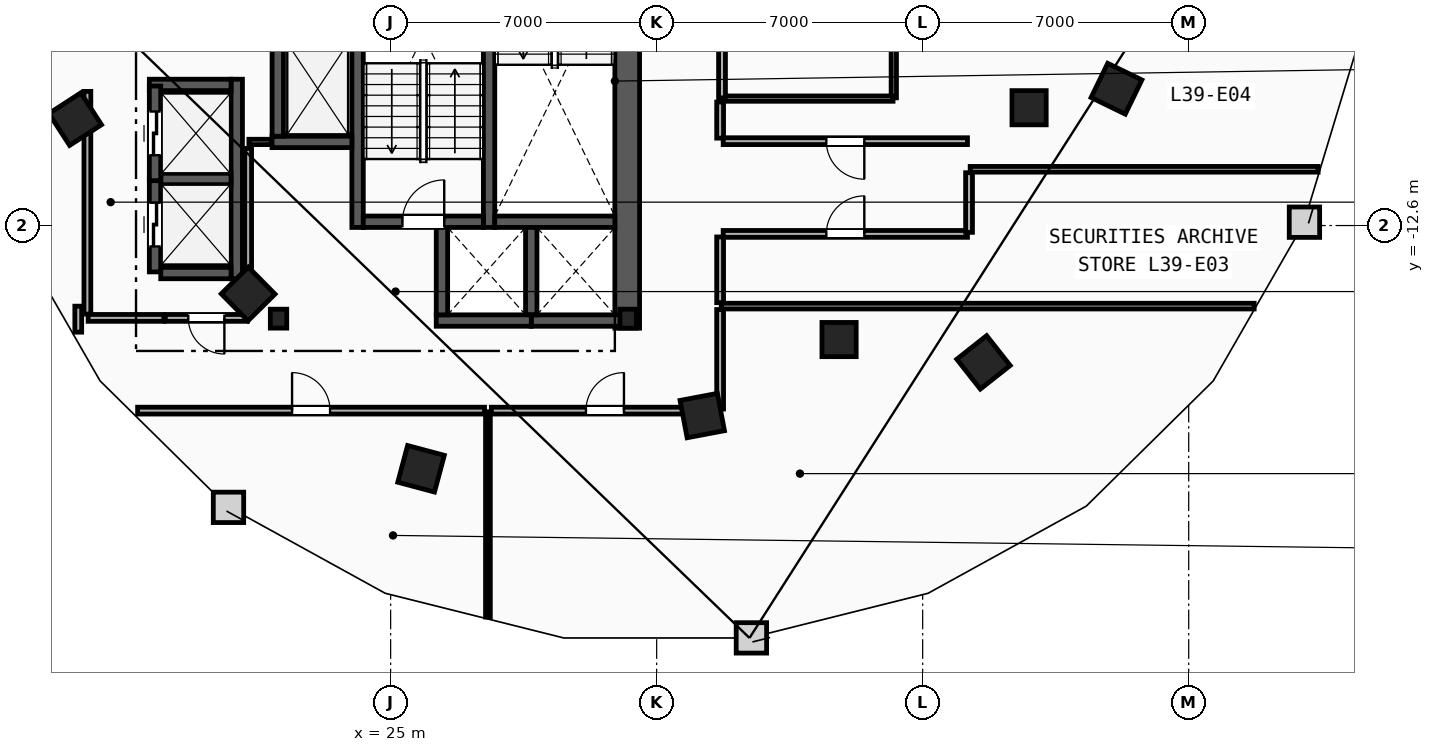
"""IFC4 building model, lengths in metres.
Left out: names, types, materials, properties, quantities, classifications, styles, units other than length and angle.
Written with IfcOpenShell. Run it as: python <this file> out.ifc"""

import sys

from ifc_helpers import new_model, si_unit, direction, frame, frame_2d, origin, origin_2d, place, context, subcontext, project, spatial, rectangle, i_section, extrude, element, fill, save


model = new_model("IFC4")
c1 = context("Model", 3, precision=1e-05, world=origin(), true_north=direction((0.0, 1.0)))
c2 = subcontext(c1, "Body", "Model", "MODEL_VIEW")
j1 = project(units=[si_unit("LENGTHUNIT", "METRE"), si_unit("PLANEANGLEUNIT", "RADIAN")], contexts=[c1])
p1 = place(None, origin())
s1 = spatial("IfcSite", under=j1, at=p1, CompositionType="ELEMENT")
p2 = place(p1, origin())
s2 = spatial("IfcBuilding", under=s1, at=p2, CompositionType="ELEMENT")
p3 = place(p2, frame((0.0, 0.0, 151.2)))
s3 = spatial("IfcBuildingStorey", under=s2, at=p3, CompositionType="ELEMENT", Elevation=151.2)
for number, where, z_axis, x_axis in (
    (1, (22.05, -15.05, 0.0), (0.0, 0.0, 1.0), (1.0, 0.0, 0.0)),
    (2, (31.25, -15.05, 0.0), (0.0, 0.0, 1.0), (1.0, 0.0, 0.0)),
):
    element("IfcColumn", number, at=place(p3, frame(where, z_axis=z_axis, x_axis=x_axis)), inside=s3, PredefinedType="COLUMN", context=c2, shape_type="SweptSolid", body=[
        extrude(i_section(OverallWidth=0.432, OverallDepth=0.498, WebThickness=0.056, FlangeThickness=0.089, FilletRadius=0.018, at=origin_2d()), origin(), (0.0, 0.0, 1.0), 3.6),
    ])
for number, where, z_axis, x_axis in (
    (3, (41.8, -9.5, 0.0), (0.0, 0.0, 1.0), (1.0, 0.0, 0.0)),
    (4, (36.8, -15.6, 0.0), (0.0, 0.0, 1.0), (1.0, 0.0, 0.0)),
):
    element("IfcColumn", number, at=place(p3, frame(where, z_axis=z_axis, x_axis=x_axis)), inside=s3, PredefinedType="COLUMN", context=c2, shape_type="SweptSolid", body=[
        extrude(rectangle(XDim=0.9, YDim=0.9, at=origin_2d()), origin(), (0.0, 0.0, 1.0), 3.6),
    ])
for number, where, z_axis, x_axis in (
    (5, (16.7, -9.8, 0.0), (0.0, 0.0, 1.0), (0.544, -0.839, 0.0)),
    (6, (21.25, -14.4, 0.0), (0.0, 0.0, 1.0), (0.703, -0.711, 0.0)),
    (7, (25.8, -19.0, 0.0), (0.0, 0.0, 1.0), (0.966, -0.259, 0.0)),
    (8, (33.2, -17.6, 0.0), (0.0, 0.0, 1.0), (0.983, 0.186, 0.0)),
    (9, (40.6, -16.2, 0.0), (0.0, 0.0, 1.0), (0.785, 0.619, 0.0)),
    (10, (44.1, -9.0, 0.0), (0.0, 0.0, 1.0), (0.437, 0.899, 0.0)),
):
    element("IfcColumn", number, at=place(p3, frame(where, z_axis=z_axis, x_axis=x_axis)), inside=s3, PredefinedType="COLUMN", context=c2, shape_type="SweptSolid", body=[
        extrude(rectangle(XDim=1.0, YDim=1.0, at=origin_2d()), origin(), (0.0, 0.0, 1.0), 3.6),
    ])
p4 = place(p3, frame((31.225, -15.3, 0.0), z_axis=(0.0, 0.0, 1.0), x_axis=(0.0, 1.0, 0.0)))
e11 = element("IfcWall", 11, at=p4, inside=s3, PredefinedType="SHEAR", context=c2, shape_type="SweptSolid", body=[
    extrude(rectangle(XDim=13.33, YDim=0.65, at=frame_2d((6.665, 0.0))), origin(), (0.0, 0.0, 1.0), 3.36),
])
for number, where, z_axis, x_axis in (
    (12, (27.59, -12.65, 0.0), (0.0, 0.0, 1.0), (0.0, 1.0, 0.0)),
    (13, (24.13, -12.65, 0.0), (0.0, 0.0, 1.0), (0.0, 1.0, 0.0)),
):
    element("IfcWall", number, at=place(p3, frame(where, z_axis=z_axis, x_axis=x_axis)), inside=s3, PredefinedType="SHEAR", context=c2, shape_type="SweptSolid", body=[
        extrude(rectangle(XDim=10.68, YDim=0.3, at=frame_2d((5.34, 0.0))), origin(), (0.0, 0.0, 1.0), 3.36),
    ])
p5 = place(p3, frame((27.74, -12.5, 0.0), z_axis=(0.0, 0.0, 1.0), x_axis=(1.0, 0.0, 0.0)))
e14 = element("IfcWall", 14, at=p5, inside=s3, PredefinedType="SHEAR", context=c2, shape_type="SweptSolid", body=[
    extrude(rectangle(XDim=3.16, YDim=0.3, at=frame_2d((1.58, 0.0))), origin(), (0.0, 0.0, 1.0), 3.36),
])
p6 = place(p3, frame((24.28, -12.5, 0.0), z_axis=(0.0, 0.0, 1.0), x_axis=(1.0, 0.0, 0.0)))
e15 = element("IfcWall", 15, at=p6, inside=s3, PredefinedType="SHEAR", context=c2, shape_type="SweptSolid", body=[
    extrude(rectangle(XDim=3.16, YDim=0.3, at=frame_2d((1.58, 0.0))), origin(), (0.0, 0.0, 1.0), 3.36),
])
p7 = place(p6, frame((1.03, 0.0, 0.0)))
e16 = element("IfcOpeningElement", 16, at=p7, cuts=e15, PredefinedType="OPENING", context=c2, shape_type="SweptSolid", body=[
    extrude(rectangle(XDim=1.1, YDim=2.15, at=frame_2d((0.55, 1.075))), frame((0.0, 0.16, 0.0), z_axis=(0.0, -1.0, 0.0), x_axis=(1.0, 0.0, 0.0)), (0.0, 0.0, 1.0), 0.32),
])
p8 = place(p3, frame((21.88, -10.4, 0.0), z_axis=(0.0, 0.0, 1.0), x_axis=(1.0, 0.0, 0.0)))
e17 = element("IfcWall", 17, at=p8, inside=s3, PredefinedType="SHEAR", context=c2, shape_type="SweptSolid", body=[
    extrude(rectangle(XDim=2.1, YDim=0.3, at=frame_2d((1.05, 0.0))), origin(), (0.0, 0.0, 1.0), 3.36),
])
for number, where, z_axis, x_axis in (
    (18, (22.03, -10.25, 0.0), (0.0, 0.0, 1.0), (0.0, 1.0, 0.0)),
    (19, (28.7, -15.1, 0.0), (0.0, 0.0, 1.0), (1.0, 0.0, 0.0)),
):
    element("IfcWall", number, at=place(p3, frame(where, z_axis=z_axis, x_axis=x_axis)), inside=s3, PredefinedType="SHEAR", context=c2, shape_type="SweptSolid", body=[
        extrude(rectangle(XDim=2.5, YDim=0.3, at=frame_2d((1.25, 0.0))), origin(), (0.0, 0.0, 1.0), 3.36),
    ])
p9 = place(p3, frame((28.7, -14.95, 0.0), z_axis=(0.0, 0.0, 1.0), x_axis=(0.0, 1.0, 0.0)))
e20 = element("IfcWall", 20, at=p9, inside=s3, PredefinedType="SHEAR", context=c2, shape_type="SweptSolid", body=[
    extrude(rectangle(XDim=2.3, YDim=0.3, at=frame_2d((1.15, 0.0))), origin(), (0.0, 0.0, 1.0), 3.36),
])
p10 = place(p3, frame((26.2, -15.1, 0.0), z_axis=(0.0, 0.0, 1.0), x_axis=(1.0, 0.0, 0.0)))
e21 = element("IfcWall", 21, at=p10, inside=s3, PredefinedType="SHEAR", context=c2, shape_type="SweptSolid", body=[
    extrude(rectangle(XDim=2.5, YDim=0.3, at=frame_2d((1.25, 0.0))), origin(), (0.0, 0.0, 1.0), 3.36),
])
p11 = place(p3, frame((26.35, -14.95, 0.0), z_axis=(0.0, 0.0, 1.0), x_axis=(0.0, 1.0, 0.0)))
e22 = element("IfcWall", 22, at=p11, inside=s3, PredefinedType="SHEAR", context=c2, shape_type="SweptSolid", body=[
    extrude(rectangle(XDim=2.3, YDim=0.3, at=frame_2d((1.15, 0.0))), origin(), (0.0, 0.0, 1.0), 3.36),
])
p12 = place(p3, frame((20.95, -14.0, 0.0), z_axis=(0.0, 0.0, 1.0), x_axis=(0.0, 1.0, 0.0)))
e23 = element("IfcWall", 23, at=p12, inside=s3, PredefinedType="SHEAR", context=c2, shape_type="SweptSolid", body=[
    extrude(rectangle(XDim=5.25, YDim=0.3, at=frame_2d((2.625, 0.0))), origin(), (0.0, 0.0, 1.0), 3.36),
])
p13 = place(p3, frame((18.95, -13.85, 0.0), z_axis=(0.0, 0.0, 1.0), x_axis=(1.0, 0.0, 0.0)))
e24 = element("IfcWall", 24, at=p13, inside=s3, PredefinedType="SHEAR", context=c2, shape_type="SweptSolid", body=[
    extrude(rectangle(XDim=1.85, YDim=0.3, at=frame_2d((0.925, 0.0))), origin(), (0.0, 0.0, 1.0), 3.36),
])
p14 = place(p3, frame((18.65, -8.9, 0.0), z_axis=(0.0, 0.0, 1.0), x_axis=(1.0, 0.0, 0.0)))
e25 = element("IfcWall", 25, at=p14, inside=s3, PredefinedType="SHEAR", context=c2, shape_type="SweptSolid", body=[
    extrude(rectangle(XDim=2.15, YDim=0.3, at=frame_2d((1.075, 0.0))), origin(), (0.0, 0.0, 1.0), 3.36),
])
p15 = place(p3, frame((18.95, -11.375, 0.0), z_axis=(0.0, 0.0, 1.0), x_axis=(1.0, 0.0, 0.0)))
e26 = element("IfcWall", 26, at=p15, inside=s3, PredefinedType="SHEAR", context=c2, shape_type="SweptSolid", body=[
    extrude(rectangle(XDim=1.85, YDim=0.3, at=frame_2d((0.925, 0.0))), origin(), (0.0, 0.0, 1.0), 3.36),
])
p16 = place(p3, frame((18.8, -13.82, 0.0), z_axis=(0.0, 0.0, 1.0), x_axis=(0.0, 1.0, 0.0)))
e27 = element("IfcWall", 27, at=p16, inside=s3, PredefinedType="SHEAR", context=c2, shape_type="SweptSolid", body=[
    extrude(rectangle(XDim=2.49, YDim=0.3, at=frame_2d((1.245, 0.0))), origin(), (0.0, 0.0, 1.0), 3.36),
])
p17 = place(p16, frame((0.67, 0.0, 0.0)))
e28 = element("IfcOpeningElement", 28, at=p17, cuts=e27, PredefinedType="OPENING", context=c2, shape_type="SweptSolid", body=[
    extrude(rectangle(XDim=1.15, YDim=2.2, at=frame_2d((0.575, 1.1))), frame((0.0, 0.16, 0.0), z_axis=(0.0, -1.0, 0.0), x_axis=(1.0, 0.0, 0.0)), (0.0, 0.0, 1.0), 0.32),
])
p18 = place(p3, frame((18.8, -11.42, 0.0), z_axis=(0.0, 0.0, 1.0), x_axis=(0.0, 1.0, 0.0)))
e29 = element("IfcWall", 29, at=p18, inside=s3, PredefinedType="SHEAR", context=c2, shape_type="SweptSolid", body=[
    extrude(rectangle(XDim=2.49, YDim=0.3, at=frame_2d((1.245, 0.0))), origin(), (0.0, 0.0, 1.0), 3.36),
])
p19 = place(p18, frame((0.67, 0.0, 0.0)))
e30 = element("IfcOpeningElement", 30, at=p19, cuts=e29, PredefinedType="OPENING", context=c2, shape_type="SweptSolid", body=[
    extrude(rectangle(XDim=1.15, YDim=2.2, at=frame_2d((0.575, 1.1))), frame((0.0, 0.16, 0.0), z_axis=(0.0, -1.0, 0.0), x_axis=(1.0, 0.0, 0.0)), (0.0, 0.0, 1.0), 0.32),
])
p20 = place(p3, frame((17.02, -14.93, 0.0), z_axis=(0.0, 0.0, 1.0), x_axis=(0.0, 1.0, 0.0)))
e31 = element("IfcWall", 31, at=p20, inside=s3, PredefinedType="PARTITIONING", context=c2, shape_type="SweptSolid", body=[
    extrude(rectangle(XDim=5.86, YDim=0.18, at=frame_2d((2.93, 0.0))), origin(), (0.0, 0.0, 1.0), 3.36),
])
p21 = place(p3, frame((17.04, -15.03, 0.0), z_axis=(0.0, 0.0, 1.0), x_axis=(1.0, 0.0, 0.0)))
e32 = element("IfcWall", 32, at=p21, inside=s3, PredefinedType="PARTITIONING", context=c2, shape_type="SweptSolid", body=[
    extrude(rectangle(XDim=1.99, YDim=0.18, at=frame_2d((0.995, 0.0))), origin(), (0.0, 0.0, 1.0), 3.36),
])
p22 = place(p3, frame((21.23, -15.03, 0.0), z_axis=(0.0, 0.0, 1.0), x_axis=(-1.0, 0.0, 0.0)))
e33 = element("IfcWall", 33, at=p22, inside=s3, PredefinedType="PARTITIONING", context=c2, shape_type="SweptSolid", body=[
    extrude(rectangle(XDim=2.16, YDim=0.18, at=frame_2d((1.08, 0.0))), origin(), (0.0, 0.0, 1.0), 3.36),
])
p23 = place(p22, frame((0.605, 0.0, 0.0)))
e34 = element("IfcOpeningElement", 34, at=p23, cuts=e33, PredefinedType="OPENING", context=c2, shape_type="SweptSolid", body=[
    extrude(rectangle(XDim=0.95, YDim=2.1, at=frame_2d((0.475, 1.05))), frame((0.0, 0.1, 0.0), z_axis=(0.0, -1.0, 0.0), x_axis=(1.0, 0.0, 0.0)), (0.0, 0.0, 1.0), 0.2),
])
p24 = place(p3, frame((21.27, -10.4, 0.0), z_axis=(0.0, 0.0, 1.0), x_axis=(1.0, 0.0, 0.0)))
e35 = element("IfcWall", 35, at=p24, inside=s3, PredefinedType="PARTITIONING", context=c2, shape_type="SweptSolid", body=[
    extrude(rectangle(XDim=0.59, YDim=0.14, at=frame_2d((0.295, 0.0))), origin(), (0.0, 0.0, 1.0), 3.36),
])
p25 = place(p3, frame((21.25, -14.93, 0.0), z_axis=(0.0, 0.0, 1.0), x_axis=(0.0, 1.0, 0.0)))
e36 = element("IfcWall", 36, at=p25, inside=s3, PredefinedType="PARTITIONING", context=c2, shape_type="SweptSolid", body=[
    extrude(rectangle(XDim=4.36, YDim=0.18, at=frame_2d((2.18, 0.0))), origin(), (0.0, 0.0, 1.0), 3.36),
])
p26 = place(p3, frame((38.24, -9.24, 0.0), z_axis=(0.0, 0.0, 1.0), x_axis=(0.0, 1.0, 0.0)))
e37 = element("IfcWall", 37, at=p26, inside=s3, PredefinedType="PARTITIONING", context=c2, shape_type="SweptSolid", body=[
    extrude(rectangle(XDim=2.635, YDim=0.14, at=frame_2d((1.317, 0.0))), origin(), (0.0, 0.0, 1.0), 3.36),
])
p27 = place(p3, frame((33.74, -9.26, 0.0), z_axis=(0.0, 0.0, 1.0), x_axis=(1.0, 0.0, 0.0)))
e38 = element("IfcWall", 38, at=p27, inside=s3, PredefinedType="PARTITIONING", context=c2, shape_type="SweptSolid", body=[
    extrude(rectangle(XDim=4.48, YDim=0.14, at=frame_2d((2.24, 0.0))), origin(), (0.0, 0.0, 1.0), 3.36),
])
p28 = place(p3, frame((33.72, -9.24, 0.0), z_axis=(0.0, 0.0, 1.0), x_axis=(0.0, 1.0, 0.0)))
e39 = element("IfcWall", 39, at=p28, inside=s3, PredefinedType="PARTITIONING", context=c2, shape_type="SweptSolid", body=[
    extrude(rectangle(XDim=4.16, YDim=0.18, at=frame_2d((2.08, 0.0))), origin(), (0.0, 0.0, 1.0), 3.36),
])
p29 = place(p28, frame((1.58, 0.0, 0.0)))
e40 = element("IfcOpeningElement", 40, at=p29, cuts=e39, PredefinedType="OPENING", context=c2, shape_type="SweptSolid", body=[
    extrude(rectangle(XDim=1.0, YDim=2.15, at=frame_2d((0.5, 1.075))), frame((0.0, 0.1, 0.0), z_axis=(0.0, -1.0, 0.0), x_axis=(1.0, 0.0, 0.0)), (0.0, 0.0, 1.0), 0.2),
])
p30 = place(p3, frame((40.25, -11.12, 0.0), z_axis=(0.0, 0.0, 1.0), x_axis=(1.0, 0.0, 0.0)))
e41 = element("IfcWall", 41, at=p30, inside=s3, PredefinedType="PARTITIONING", context=c2, shape_type="SweptSolid", body=[
    extrude(rectangle(XDim=9.156, YDim=0.15, at=frame_2d((4.578, 0.0))), origin(), (0.0, 0.0, 1.0), 3.36),
])
p31 = place(p3, frame((33.7, -14.72, 0.0), z_axis=(0.0, 0.0, 1.0), x_axis=(1.0, 0.0, 0.0)))
e42 = element("IfcWall", 42, at=p31, inside=s3, PredefinedType="PARTITIONING", context=c2, shape_type="SweptSolid", body=[
    extrude(rectangle(XDim=14.023, YDim=0.15, at=frame_2d((7.011, 0.0))), origin(), (0.0, 0.0, 1.0), 3.36),
])
p32 = place(p3, frame((27.56, -22.901, 0.0), z_axis=(0.0, 0.0, 1.0), x_axis=(0.0, 1.0, 0.0)))
e43 = element("IfcWall", 43, at=p32, inside=s3, PredefinedType="PARTITIONING", context=c2, shape_type="SweptSolid", body=[
    extrude(rectangle(XDim=5.401, YDim=0.125, at=frame_2d((2.701, 0.0))), origin(), (0.0, 0.0, 1.0), 3.36),
])
p33 = place(p3, frame((18.342, -17.47, 0.0), z_axis=(0.0, 0.0, 1.0), x_axis=(1.0, 0.0, 0.0)))
e44 = element("IfcWall", 44, at=p33, inside=s3, PredefinedType="PARTITIONING", context=c2, shape_type="SweptSolid", body=[
    extrude(rectangle(XDim=9.128, YDim=0.18, at=frame_2d((4.564, 0.0))), origin(), (0.0, 0.0, 1.0), 3.36),
])
p34 = place(p33, frame((4.064, 0.0, 0.0)))
e45 = element("IfcOpeningElement", 45, at=p34, cuts=e44, PredefinedType="OPENING", context=c2, shape_type="SweptSolid", body=[
    extrude(rectangle(XDim=1.0, YDim=2.15, at=frame_2d((0.5, 1.075))), frame((0.0, 0.1, 0.0), z_axis=(0.0, -1.0, 0.0), x_axis=(1.0, 0.0, 0.0)), (0.0, 0.0, 1.0), 0.2),
])
p35 = place(p3, frame((27.65, -17.47, 0.0), z_axis=(0.0, 0.0, 1.0), x_axis=(1.0, 0.0, 0.0)))
e46 = element("IfcWall", 46, at=p35, inside=s3, PredefinedType="PARTITIONING", context=c2, shape_type="SweptSolid", body=[
    extrude(rectangle(XDim=5.979, YDim=0.18, at=frame_2d((2.989, 0.0))), origin(), (0.0, 0.0, 1.0), 3.36),
])
p36 = place(p35, frame((2.489, 0.0, 0.0)))
e47 = element("IfcOpeningElement", 47, at=p36, cuts=e46, PredefinedType="OPENING", context=c2, shape_type="SweptSolid", body=[
    extrude(rectangle(XDim=1.0, YDim=2.15, at=frame_2d((0.5, 1.075))), frame((0.0, 0.1, 0.0), z_axis=(0.0, -1.0, 0.0), x_axis=(1.0, 0.0, 0.0)), (0.0, 0.0, 1.0), 0.2),
])
p37 = place(p3, frame((33.67, -17.428, 0.0), z_axis=(0.0, 0.0, 1.0), x_axis=(0.0, 1.0, 0.0)))
e48 = element("IfcWall", 48, at=p37, inside=s3, PredefinedType="PARTITIONING", context=c2, shape_type="SweptSolid", body=[
    extrude(rectangle(XDim=2.618, YDim=0.18, at=frame_2d((1.309, 0.0))), origin(), (0.0, 0.0, 1.0), 3.36),
])
p38 = place(p3, frame((33.75, -12.82, 0.0), z_axis=(0.0, 0.0, 1.0), x_axis=(1.0, 0.0, 0.0)))
e49 = element("IfcWall", 49, at=p38, inside=s3, PredefinedType="PARTITIONING", context=c2, shape_type="SweptSolid", body=[
    extrude(rectangle(XDim=6.428, YDim=0.18, at=frame_2d((3.214, 0.0))), origin(), (0.0, 0.0, 1.0), 3.36),
])
p39 = place(p38, frame((2.714, 0.0, 0.0)))
e50 = element("IfcOpeningElement", 50, at=p39, cuts=e49, PredefinedType="OPENING", context=c2, shape_type="SweptSolid", body=[
    extrude(rectangle(XDim=1.0, YDim=2.15, at=frame_2d((0.5, 1.075))), frame((0.0, 0.1, 0.0), z_axis=(0.0, -1.0, 0.0), x_axis=(1.0, 0.0, 0.0)), (0.0, 0.0, 1.0), 0.2),
])
p40 = place(p3, frame((33.67, -14.63, 0.0), z_axis=(0.0, 0.0, 1.0), x_axis=(0.0, 1.0, 0.0)))
e51 = element("IfcWall", 51, at=p40, inside=s3, PredefinedType="PARTITIONING", context=c2, shape_type="SweptSolid", body=[
    extrude(rectangle(XDim=1.73, YDim=0.18, at=frame_2d((0.865, 0.0))), origin(), (0.0, 0.0, 1.0), 3.36),
])
p41 = place(p3, frame((40.22, -12.779, 0.0), z_axis=(0.0, 0.0, 1.0), x_axis=(0.0, 1.0, 0.0)))
e52 = element("IfcWall", 52, at=p41, inside=s3, PredefinedType="PARTITIONING", context=c2, shape_type="SweptSolid", body=[
    extrude(rectangle(XDim=1.569, YDim=0.18, at=frame_2d((0.784, 0.0))), origin(), (0.0, 0.0, 1.0), 3.36),
])
p42 = place(p3, frame((40.178, -10.38, 0.0), z_axis=(0.0, 0.0, 1.0), x_axis=(-1.0, 0.0, 0.0)))
e53 = element("IfcWall", 53, at=p42, inside=s3, PredefinedType="PARTITIONING", context=c2, shape_type="SweptSolid", body=[
    extrude(rectangle(XDim=6.428, YDim=0.18, at=frame_2d((3.214, 0.0))), origin(), (0.0, 0.0, 1.0), 3.36),
])
p43 = place(p42, frame((2.714, 0.0, 0.0)))
e54 = element("IfcOpeningElement", 54, at=p43, cuts=e53, PredefinedType="OPENING", context=c2, shape_type="SweptSolid", body=[
    extrude(rectangle(XDim=1.0, YDim=2.15, at=frame_2d((0.5, 1.075))), frame((0.0, 0.1, 0.0), z_axis=(0.0, -1.0, 0.0), x_axis=(1.0, 0.0, 0.0)), (0.0, 0.0, 1.0), 0.2),
])
p44 = place(p3, frame((33.67, -10.3, 0.0), z_axis=(0.0, 0.0, 1.0), x_axis=(0.0, 1.0, 0.0)))
e55 = element("IfcWall", 55, at=p44, inside=s3, PredefinedType="PARTITIONING", context=c2, shape_type="SweptSolid", body=[
    extrude(rectangle(XDim=0.949, YDim=0.18, at=frame_2d((0.474, 0.0))), origin(), (0.0, 0.0, 1.0), 3.36),
])
p45 = place(p3, frame((16.78, -14.721, 0.0), z_axis=(0.0, 0.0, 1.0), x_axis=(0.0, -1.0, 0.0)))
e56 = element("IfcWall", 56, at=p45, inside=s3, PredefinedType="PARTITIONING", context=c2, shape_type="SweptSolid", body=[
    extrude(rectangle(XDim=0.684, YDim=0.18, at=frame_2d((0.342, 0.0))), origin(), (0.0, 0.0, 1.0), 3.36),
])
p46 = place(p7, origin())
e57 = element("IfcDoor", 57, at=p46, inside=s3, OperationType="SINGLE_SWING_RIGHT", PredefinedType="DOOR", context=c2, shape_type="SweptSolid", body=[
    extrude(rectangle(XDim=1.1, YDim=2.15, at=frame_2d((0.55, 1.075))), frame((0.0, 0.025, 0.0), z_axis=(0.0, -1.0, 0.0), x_axis=(1.0, 0.0, 0.0)), (0.0, 0.0, 1.0), 0.05),
])
fill(e16, e57)
p47 = place(p17, origin())
e58 = element("IfcDoor", 58, at=p47, inside=s3, OperationType="SLIDING_TO_LEFT", PredefinedType="TRAPDOOR", context=c2, shape_type="SweptSolid", body=[
    extrude(rectangle(XDim=1.15, YDim=2.2, at=frame_2d((0.575, 1.1))), frame((0.0, 0.025, 0.0), z_axis=(0.0, -1.0, 0.0), x_axis=(1.0, 0.0, 0.0)), (0.0, 0.0, 1.0), 0.05),
])
fill(e28, e58)
p48 = place(p19, origin())
e59 = element("IfcDoor", 59, at=p48, inside=s3, OperationType="SLIDING_TO_LEFT", PredefinedType="TRAPDOOR", context=c2, shape_type="SweptSolid", body=[
    extrude(rectangle(XDim=1.15, YDim=2.2, at=frame_2d((0.575, 1.1))), frame((0.0, 0.025, 0.0), z_axis=(0.0, -1.0, 0.0), x_axis=(1.0, 0.0, 0.0)), (0.0, 0.0, 1.0), 0.05),
])
fill(e30, e59)
p49 = place(p34, origin())
e60 = element("IfcDoor", 60, at=p49, inside=s3, OperationType="SINGLE_SWING_LEFT", PredefinedType="DOOR", context=c2, shape_type="SweptSolid", body=[
    extrude(rectangle(XDim=1.0, YDim=2.15, at=frame_2d((0.5, 1.075))), frame((0.0, 0.025, 0.0), z_axis=(0.0, -1.0, 0.0), x_axis=(1.0, 0.0, 0.0)), (0.0, 0.0, 1.0), 0.05),
])
fill(e45, e60)
p50 = place(p39, origin())
e61 = element("IfcDoor", 61, at=p50, inside=s3, OperationType="SINGLE_SWING_RIGHT", PredefinedType="DOOR", context=c2, shape_type="SweptSolid", body=[
    extrude(rectangle(XDim=1.0, YDim=2.15, at=frame_2d((0.5, 1.075))), frame((0.0, 0.025, 0.0), z_axis=(0.0, -1.0, 0.0), x_axis=(1.0, 0.0, 0.0)), (0.0, 0.0, 1.0), 0.05),
])
fill(e50, e61)
p51 = place(p43, origin())
e62 = element("IfcDoor", 62, at=p51, inside=s3, OperationType="SINGLE_SWING_LEFT", PredefinedType="DOOR", context=c2, shape_type="SweptSolid", body=[
    extrude(rectangle(XDim=1.0, YDim=2.15, at=frame_2d((0.5, 1.075))), frame((0.0, 0.025, 0.0), z_axis=(0.0, -1.0, 0.0), x_axis=(1.0, 0.0, 0.0)), (0.0, 0.0, 1.0), 0.05),
])
fill(e54, e62)
p52 = place(p36, origin())
e63 = element("IfcDoor", 63, at=p52, inside=s3, OperationType="SINGLE_SWING_RIGHT", PredefinedType="DOOR", context=c2, shape_type="SweptSolid", body=[
    extrude(rectangle(XDim=1.0, YDim=2.15, at=frame_2d((0.5, 1.075))), frame((0.0, 0.025, 0.0), z_axis=(0.0, -1.0, 0.0), x_axis=(1.0, 0.0, 0.0)), (0.0, 0.0, 1.0), 0.05),
])
fill(e47, e63)
p53 = place(p23, origin())
e64 = element("IfcDoor", 64, at=p53, inside=s3, OperationType="SINGLE_SWING_LEFT", PredefinedType="DOOR", context=c2, shape_type="SweptSolid", body=[
    extrude(rectangle(XDim=0.95, YDim=2.1, at=frame_2d((0.475, 1.05))), frame((0.0, 0.025, 0.0), z_axis=(0.0, -1.0, 0.0), x_axis=(1.0, 0.0, 0.0)), (0.0, 0.0, 1.0), 0.05),
])
fill(e34, e64)
save(model, sys.argv[1])
